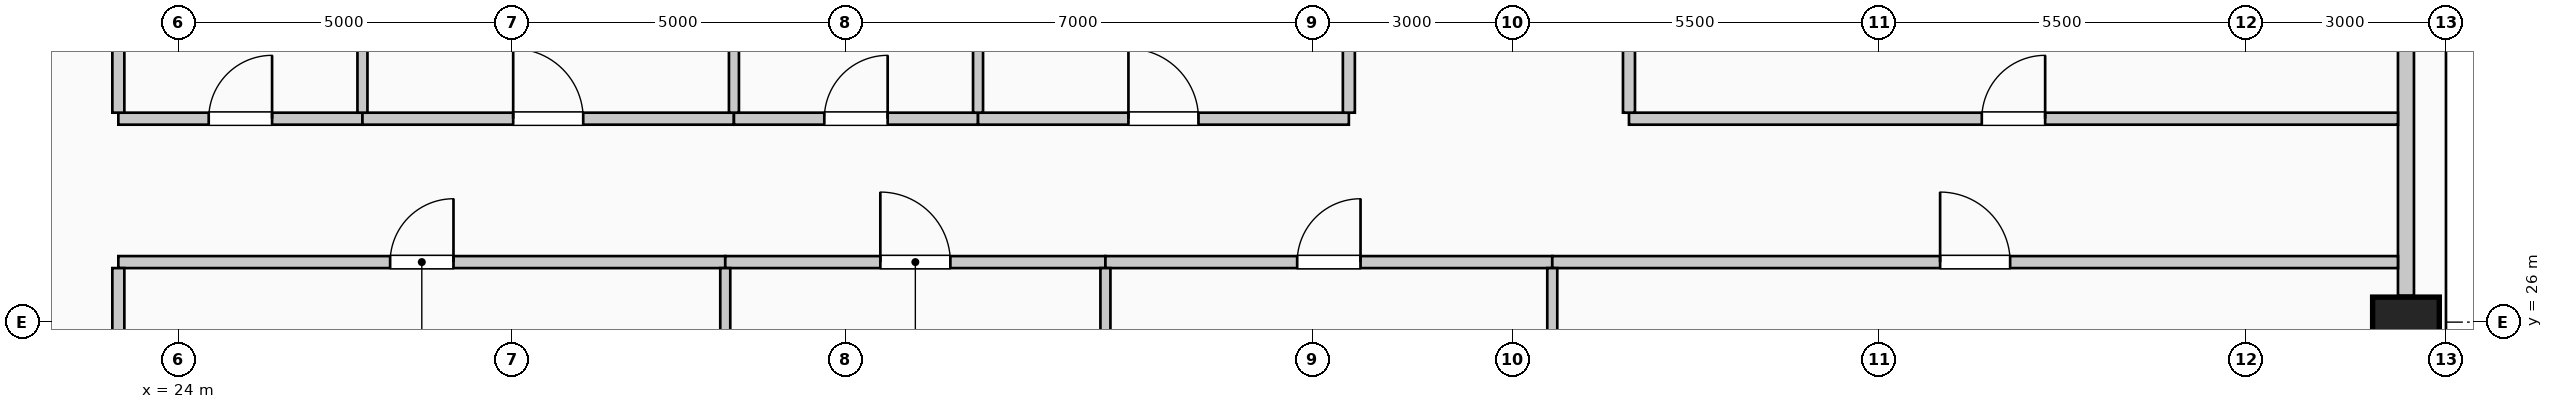
"""IFC4 building model, lengths in metres.
Left out: names, types, materials, properties, quantities, classifications, styles, units other than length and angle.
Written with IfcOpenShell. Run it as: python <this file> out.ifc"""

import sys

from ifc_helpers import new_model, si_unit, direction, frame, frame_2d, origin, origin_2d, place, context, subcontext, project, spatial, rectangle, extrude, element, fill, save


model = new_model("IFC4")
c1 = context("Model", 3, precision=1e-05, world=origin(), true_north=direction((0.0, 1.0)))
c2 = subcontext(c1, "Body", "Model", "MODEL_VIEW")
j1 = project(units=[si_unit("LENGTHUNIT", "METRE"), si_unit("PLANEANGLEUNIT", "RADIAN")], contexts=[c1])
p1 = place(None, origin())
s1 = spatial("IfcSite", under=j1, at=p1, CompositionType="ELEMENT")
p2 = place(p1, origin())
s2 = spatial("IfcBuilding", under=s1, at=p2, CompositionType="ELEMENT")
p3 = place(p2, frame((0.0, 0.0, 226.6)))
s3 = spatial("IfcBuildingStorey", under=s2, at=p3, CompositionType="ELEMENT", Elevation=226.6)
p4 = place(p3, frame((57.4, 26.0, 0.0), z_axis=(0.0, 0.0, 1.0), x_axis=(0.0, 1.0, 0.0)))
e1 = element("IfcColumn", 1, at=p4, inside=s3, PredefinedType="COLUMN", context=c2, shape_type="SweptSolid", body=[
    extrude(rectangle(XDim=0.75, YDim=1.0, at=origin_2d()), origin(), (0.0, 0.0, 1.0), 4.0),
])
p5 = place(p3, frame((57.4, 33.605, 0.0), z_axis=(0.0, 0.0, 1.0), x_axis=(0.0, -1.0, 0.0)))
e2 = element("IfcWall", 2, at=p5, inside=s3, PredefinedType="SOLIDWALL", context=c2, shape_type="SweptSolid", body=[
    extrude(rectangle(XDim=7.21, YDim=0.24, at=frame_2d((3.605, 0.0))), origin(), (0.0, 0.0, 1.0), 3.0),
])
p6 = place(p3, frame((23.1, 26.9, 0.0), z_axis=(0.0, 0.0, 1.0), x_axis=(1.0, 0.0, 0.0)))
e3 = element("IfcWall", 3, at=p6, inside=s3, PredefinedType="PARTITIONING", context=c2, shape_type="SweptSolid", body=[
    extrude(rectangle(XDim=9.1, YDim=0.18, at=frame_2d((4.55, 0.0))), origin(), (0.0, 0.0, 1.0), 3.75),
])
p7 = place(p6, frame((4.075, 0.0, 0.0)))
e4 = element("IfcOpeningElement", 4, at=p7, cuts=e3, PredefinedType="OPENING", context=c2, shape_type="SweptSolid", body=[
    extrude(rectangle(XDim=0.95, YDim=2.15, at=frame_2d((0.475, 1.075))), frame((0.0, 0.1, 0.0), z_axis=(0.0, -1.0, 0.0), x_axis=(1.0, 0.0, 0.0)), (0.0, 0.0, 1.0), 0.2),
])
p8 = place(p3, frame((32.2, 26.9, 0.0), z_axis=(0.0, 0.0, 1.0), x_axis=(1.0, 0.0, 0.0)))
e5 = element("IfcWall", 5, at=p8, inside=s3, PredefinedType="PARTITIONING", context=c2, shape_type="SweptSolid", body=[
    extrude(rectangle(XDim=5.7, YDim=0.18, at=frame_2d((2.85, 0.0))), origin(), (0.0, 0.0, 1.0), 3.75),
])
p9 = place(p8, frame((2.325, 0.0, 0.0)))
e6 = element("IfcOpeningElement", 6, at=p9, cuts=e5, PredefinedType="OPENING", context=c2, shape_type="SweptSolid", body=[
    extrude(rectangle(XDim=1.05, YDim=2.15, at=frame_2d((0.525, 1.075))), frame((0.0, 0.1, 0.0), z_axis=(0.0, -1.0, 0.0), x_axis=(1.0, 0.0, 0.0)), (0.0, 0.0, 1.0), 0.2),
])
p10 = place(p3, frame((37.9, 26.9, 0.0), z_axis=(0.0, 0.0, 1.0), x_axis=(1.0, 0.0, 0.0)))
e7 = element("IfcWall", 7, at=p10, inside=s3, PredefinedType="PARTITIONING", context=c2, shape_type="SweptSolid", body=[
    extrude(rectangle(XDim=6.7, YDim=0.18, at=frame_2d((3.35, 0.0))), origin(), (0.0, 0.0, 1.0), 3.75),
])
p11 = place(p10, frame((2.875, 0.0, 0.0)))
e8 = element("IfcOpeningElement", 8, at=p11, cuts=e7, PredefinedType="OPENING", context=c2, shape_type="SweptSolid", body=[
    extrude(rectangle(XDim=0.95, YDim=2.15, at=frame_2d((0.475, 1.075))), frame((0.0, 0.1, 0.0), z_axis=(0.0, -1.0, 0.0), x_axis=(1.0, 0.0, 0.0)), (0.0, 0.0, 1.0), 0.2),
])
p12 = place(p3, frame((44.6, 26.9, 0.0), z_axis=(0.0, 0.0, 1.0), x_axis=(1.0, 0.0, 0.0)))
e9 = element("IfcWall", 9, at=p12, inside=s3, PredefinedType="PARTITIONING", context=c2, shape_type="SweptSolid", body=[
    extrude(rectangle(XDim=12.68, YDim=0.18, at=frame_2d((6.34, 0.0))), origin(), (0.0, 0.0, 1.0), 3.75),
])
p13 = place(p12, frame((5.815, 0.0, 0.0)))
e10 = element("IfcOpeningElement", 10, at=p13, cuts=e9, PredefinedType="OPENING", context=c2, shape_type="SweptSolid", body=[
    extrude(rectangle(XDim=1.05, YDim=2.15, at=frame_2d((0.525, 1.075))), frame((0.0, 0.1, 0.0), z_axis=(0.0, -1.0, 0.0), x_axis=(1.0, 0.0, 0.0)), (0.0, 0.0, 1.0), 0.2),
])
p14 = place(p3, frame((23.1, 29.05, 0.0), z_axis=(0.0, 0.0, 1.0), x_axis=(1.0, 0.0, 0.0)))
e11 = element("IfcWall", 11, at=p14, inside=s3, PredefinedType="PARTITIONING", context=c2, shape_type="SweptSolid", body=[
    extrude(rectangle(XDim=3.66, YDim=0.18, at=frame_2d((1.83, 0.0))), origin(), (0.0, 0.0, 1.0), 3.75),
])
p15 = place(p14, frame((1.355, 0.0, 0.0)))
e12 = element("IfcOpeningElement", 12, at=p15, cuts=e11, PredefinedType="OPENING", context=c2, shape_type="SweptSolid", body=[
    extrude(rectangle(XDim=0.95, YDim=2.15, at=frame_2d((0.475, 1.075))), frame((0.0, 0.1, 0.0), z_axis=(0.0, -1.0, 0.0), x_axis=(1.0, 0.0, 0.0)), (0.0, 0.0, 1.0), 0.2),
])
p16 = place(p3, frame((26.76, 29.05, 0.0), z_axis=(0.0, 0.0, 1.0), x_axis=(1.0, 0.0, 0.0)))
e13 = element("IfcWall", 13, at=p16, inside=s3, PredefinedType="PARTITIONING", context=c2, shape_type="SweptSolid", body=[
    extrude(rectangle(XDim=5.57, YDim=0.18, at=frame_2d((2.785, 0.0))), origin(), (0.0, 0.0, 1.0), 3.75),
])
p17 = place(p16, frame((2.26, 0.0, 0.0)))
e14 = element("IfcOpeningElement", 14, at=p17, cuts=e13, PredefinedType="OPENING", context=c2, shape_type="SweptSolid", body=[
    extrude(rectangle(XDim=1.05, YDim=2.15, at=frame_2d((0.525, 1.075))), frame((0.0, 0.1, 0.0), z_axis=(0.0, -1.0, 0.0), x_axis=(1.0, 0.0, 0.0)), (0.0, 0.0, 1.0), 0.2),
])
p18 = place(p3, frame((32.33, 29.05, 0.0), z_axis=(0.0, 0.0, 1.0), x_axis=(1.0, 0.0, 0.0)))
e15 = element("IfcWall", 15, at=p18, inside=s3, PredefinedType="PARTITIONING", context=c2, shape_type="SweptSolid", body=[
    extrude(rectangle(XDim=3.66, YDim=0.18, at=frame_2d((1.83, 0.0))), origin(), (0.0, 0.0, 1.0), 3.75),
])
p19 = place(p18, frame((1.355, 0.0, 0.0)))
e16 = element("IfcOpeningElement", 16, at=p19, cuts=e15, PredefinedType="OPENING", context=c2, shape_type="SweptSolid", body=[
    extrude(rectangle(XDim=0.95, YDim=2.15, at=frame_2d((0.475, 1.075))), frame((0.0, 0.1, 0.0), z_axis=(0.0, -1.0, 0.0), x_axis=(1.0, 0.0, 0.0)), (0.0, 0.0, 1.0), 0.2),
])
p20 = place(p3, frame((35.99, 29.05, 0.0), z_axis=(0.0, 0.0, 1.0), x_axis=(1.0, 0.0, 0.0)))
e17 = element("IfcWall", 17, at=p20, inside=s3, PredefinedType="PARTITIONING", context=c2, shape_type="SweptSolid", body=[
    extrude(rectangle(XDim=5.56, YDim=0.18, at=frame_2d((2.78, 0.0))), origin(), (0.0, 0.0, 1.0), 3.75),
])
p21 = place(p20, frame((2.255, 0.0, 0.0)))
e18 = element("IfcOpeningElement", 18, at=p21, cuts=e17, PredefinedType="OPENING", context=c2, shape_type="SweptSolid", body=[
    extrude(rectangle(XDim=1.05, YDim=2.15, at=frame_2d((0.525, 1.075))), frame((0.0, 0.1, 0.0), z_axis=(0.0, -1.0, 0.0), x_axis=(1.0, 0.0, 0.0)), (0.0, 0.0, 1.0), 0.2),
])
p22 = place(p3, frame((45.75, 29.05, 0.0), z_axis=(0.0, 0.0, 1.0), x_axis=(1.0, 0.0, 0.0)))
e19 = element("IfcWall", 19, at=p22, inside=s3, PredefinedType="PARTITIONING", context=c2, shape_type="SweptSolid", body=[
    extrude(rectangle(XDim=11.53, YDim=0.18, at=frame_2d((5.765, 0.0))), origin(), (0.0, 0.0, 1.0), 3.75),
])
p23 = place(p22, frame((5.29, 0.0, 0.0)))
e20 = element("IfcOpeningElement", 20, at=p23, cuts=e19, PredefinedType="OPENING", context=c2, shape_type="SweptSolid", body=[
    extrude(rectangle(XDim=0.95, YDim=2.15, at=frame_2d((0.475, 1.075))), frame((0.0, 0.1, 0.0), z_axis=(0.0, -1.0, 0.0), x_axis=(1.0, 0.0, 0.0)), (0.0, 0.0, 1.0), 0.2),
])
p24 = place(p3, frame((23.1, 17.3, 0.0), z_axis=(0.0, 0.0, 1.0), x_axis=(0.0, 1.0, 0.0)))
e21 = element("IfcWall", 21, at=p24, inside=s3, PredefinedType="PARTITIONING", context=c2, shape_type="SweptSolid", body=[
    extrude(rectangle(XDim=9.51, YDim=0.18, at=frame_2d((4.755, 0.0))), origin(), (0.0, 0.0, 1.0), 3.75),
])
p25 = place(p3, frame((23.1, 29.14, 0.0), z_axis=(0.0, 0.0, 1.0), x_axis=(0.0, 1.0, 0.0)))
e22 = element("IfcWall", 22, at=p25, inside=s3, PredefinedType="PARTITIONING", context=c2, shape_type="SweptSolid", body=[
    extrude(rectangle(XDim=3.12, YDim=0.18, at=frame_2d((1.56, 0.0))), origin(), (0.0, 0.0, 1.0), 3.75),
])
p26 = place(p3, frame((26.76, 29.14, 0.0), z_axis=(0.0, 0.0, 1.0), x_axis=(0.0, 1.0, 0.0)))
e23 = element("IfcWall", 23, at=p26, inside=s3, PredefinedType="PARTITIONING", context=c2, shape_type="SweptSolid", body=[
    extrude(rectangle(XDim=16.14, YDim=0.15, at=frame_2d((8.07, 0.0))), origin(), (0.0, 0.0, 1.0), 3.75),
])
p27 = place(p3, frame((32.2, 0.72, 0.0), z_axis=(0.0, 0.0, 1.0), x_axis=(0.0, 1.0, 0.0)))
e24 = element("IfcWall", 24, at=p27, inside=s3, PredefinedType="PARTITIONING", context=c2, shape_type="SweptSolid", body=[
    extrude(rectangle(XDim=26.09, YDim=0.15, at=frame_2d((13.045, 0.0))), origin(), (0.0, 0.0, 1.0), 3.75),
])
for number, where, z_axis, x_axis in (
    (25, (32.33, 29.14, 0.0), (0.0, 0.0, 1.0), (0.0, 1.0, 0.0)),
    (26, (35.99, 29.14, 0.0), (0.0, 0.0, 1.0), (0.0, 1.0, 0.0)),
):
    element("IfcWall", number, at=place(p3, frame(where, z_axis=z_axis, x_axis=x_axis)), inside=s3, PredefinedType="PARTITIONING", context=c2, shape_type="SweptSolid", body=[
        extrude(rectangle(XDim=16.14, YDim=0.15, at=frame_2d((8.07, 0.0))), origin(), (0.0, 0.0, 1.0), 3.75),
    ])
p28 = place(p3, frame((37.9, 0.72, 0.0), z_axis=(0.0, 0.0, 1.0), x_axis=(0.0, 1.0, 0.0)))
e27 = element("IfcWall", 27, at=p28, inside=s3, PredefinedType="PARTITIONING", context=c2, shape_type="SweptSolid", body=[
    extrude(rectangle(XDim=26.09, YDim=0.15, at=frame_2d((13.045, 0.0))), origin(), (0.0, 0.0, 1.0), 3.75),
])
p29 = place(p3, frame((41.55, 29.14, 0.0), z_axis=(0.0, 0.0, 1.0), x_axis=(0.0, 1.0, 0.0)))
e28 = element("IfcWall", 28, at=p29, inside=s3, PredefinedType="PARTITIONING", context=c2, shape_type="SweptSolid", body=[
    extrude(rectangle(XDim=3.21, YDim=0.18, at=frame_2d((1.605, 0.0))), origin(), (0.0, 0.0, 1.0), 3.145),
])
p30 = place(p3, frame((44.6, 0.72, 0.0), z_axis=(0.0, 0.0, 1.0), x_axis=(0.0, 1.0, 0.0)))
e29 = element("IfcWall", 29, at=p30, inside=s3, PredefinedType="PARTITIONING", context=c2, shape_type="SweptSolid", body=[
    extrude(rectangle(XDim=26.09, YDim=0.15, at=frame_2d((13.045, 0.0))), origin(), (0.0, 0.0, 1.0), 3.75),
])
p31 = place(p3, frame((45.75, 29.14, 0.0), z_axis=(0.0, 0.0, 1.0), x_axis=(0.0, 1.0, 0.0)))
e30 = element("IfcWall", 30, at=p31, inside=s3, PredefinedType="PARTITIONING", context=c2, shape_type="SweptSolid", body=[
    extrude(rectangle(XDim=3.135, YDim=0.18, at=frame_2d((1.567, 0.0))), origin(), (0.0, 0.0, 1.0), 3.75),
])
p32 = place(p7, origin())
e31 = element("IfcDoor", 31, at=p32, inside=s3, OperationType="SINGLE_SWING_RIGHT", PredefinedType="DOOR", context=c2, shape_type="SweptSolid", body=[
    extrude(rectangle(XDim=0.95, YDim=2.15, at=frame_2d((0.475, 1.075))), frame((0.0, 0.025, 0.0), z_axis=(0.0, -1.0, 0.0), x_axis=(1.0, 0.0, 0.0)), (0.0, 0.0, 1.0), 0.05),
])
fill(e4, e31)
p33 = place(p9, origin())
e32 = element("IfcDoor", 32, at=p33, inside=s3, OperationType="SINGLE_SWING_LEFT", PredefinedType="DOOR", context=c2, shape_type="SweptSolid", body=[
    extrude(rectangle(XDim=1.05, YDim=2.15, at=frame_2d((0.525, 1.075))), frame((0.0, 0.025, 0.0), z_axis=(0.0, -1.0, 0.0), x_axis=(1.0, 0.0, 0.0)), (0.0, 0.0, 1.0), 0.05),
])
fill(e6, e32)
p34 = place(p11, origin())
e33 = element("IfcDoor", 33, at=p34, inside=s3, OperationType="SINGLE_SWING_RIGHT", PredefinedType="DOOR", context=c2, shape_type="SweptSolid", body=[
    extrude(rectangle(XDim=0.95, YDim=2.15, at=frame_2d((0.475, 1.075))), frame((0.0, 0.025, 0.0), z_axis=(0.0, -1.0, 0.0), x_axis=(1.0, 0.0, 0.0)), (0.0, 0.0, 1.0), 0.05),
])
fill(e8, e33)
p35 = place(p13, origin())
e34 = element("IfcDoor", 34, at=p35, inside=s3, OperationType="SINGLE_SWING_LEFT", PredefinedType="DOOR", context=c2, shape_type="SweptSolid", body=[
    extrude(rectangle(XDim=1.05, YDim=2.15, at=frame_2d((0.525, 1.075))), frame((0.0, 0.025, 0.0), z_axis=(0.0, -1.0, 0.0), x_axis=(1.0, 0.0, 0.0)), (0.0, 0.0, 1.0), 0.05),
])
fill(e10, e34)
p36 = place(p15, origin())
e35 = element("IfcDoor", 35, at=p36, inside=s3, OperationType="SINGLE_SWING_RIGHT", PredefinedType="DOOR", context=c2, shape_type="SweptSolid", body=[
    extrude(rectangle(XDim=0.95, YDim=2.15, at=frame_2d((0.475, 1.075))), frame((0.0, 0.025, 0.0), z_axis=(0.0, -1.0, 0.0), x_axis=(1.0, 0.0, 0.0)), (0.0, 0.0, 1.0), 0.05),
])
fill(e12, e35)
p37 = place(p17, origin())
e36 = element("IfcDoor", 36, at=p37, inside=s3, OperationType="SINGLE_SWING_LEFT", PredefinedType="DOOR", context=c2, shape_type="SweptSolid", body=[
    extrude(rectangle(XDim=1.05, YDim=2.15, at=frame_2d((0.525, 1.075))), frame((0.0, 0.025, 0.0), z_axis=(0.0, -1.0, 0.0), x_axis=(1.0, 0.0, 0.0)), (0.0, 0.0, 1.0), 0.05),
])
fill(e14, e36)
p38 = place(p19, origin())
e37 = element("IfcDoor", 37, at=p38, inside=s3, OperationType="SINGLE_SWING_RIGHT", PredefinedType="DOOR", context=c2, shape_type="SweptSolid", body=[
    extrude(rectangle(XDim=0.95, YDim=2.15, at=frame_2d((0.475, 1.075))), frame((0.0, 0.025, 0.0), z_axis=(0.0, -1.0, 0.0), x_axis=(1.0, 0.0, 0.0)), (0.0, 0.0, 1.0), 0.05),
])
fill(e16, e37)
p39 = place(p21, origin())
e38 = element("IfcDoor", 38, at=p39, inside=s3, OperationType="SINGLE_SWING_LEFT", PredefinedType="DOOR", context=c2, shape_type="SweptSolid", body=[
    extrude(rectangle(XDim=1.05, YDim=2.15, at=frame_2d((0.525, 1.075))), frame((0.0, 0.025, 0.0), z_axis=(0.0, -1.0, 0.0), x_axis=(1.0, 0.0, 0.0)), (0.0, 0.0, 1.0), 0.05),
])
fill(e18, e38)
p40 = place(p23, origin())
e39 = element("IfcDoor", 39, at=p40, inside=s3, OperationType="SINGLE_SWING_RIGHT", PredefinedType="DOOR", context=c2, shape_type="SweptSolid", body=[
    extrude(rectangle(XDim=0.95, YDim=2.15, at=frame_2d((0.475, 1.075))), frame((0.0, 0.025, 0.0), z_axis=(0.0, -1.0, 0.0), x_axis=(1.0, 0.0, 0.0)), (0.0, 0.0, 1.0), 0.05),
])
fill(e20, e39)
save(model, sys.argv[1])
